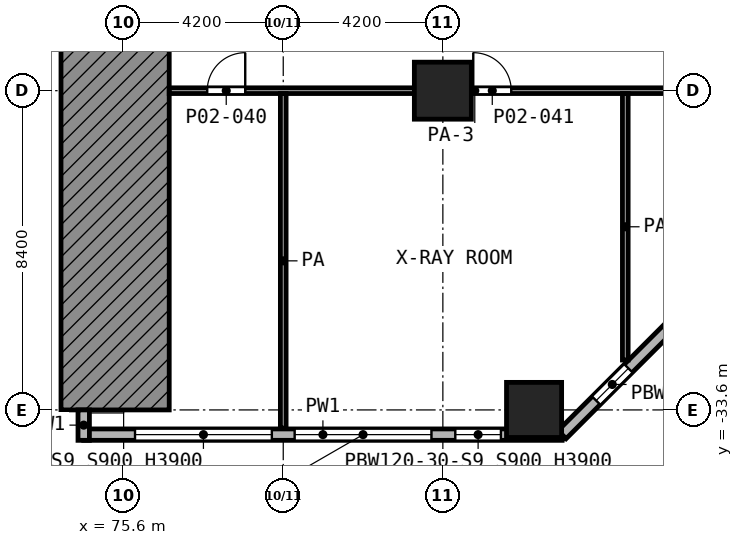
"""IFC4 building model, lengths in metres.
Left out: names, types, materials, properties, quantities, classifications, styles, units other than length and angle.
Written with IfcOpenShell. Run it as: python <this file> out.ifc"""

import sys

from ifc_helpers import new_model, si_unit, direction, frame, frame_2d, origin, origin_2d, place, context, subcontext, project, spatial, polyline, rectangle, outline, extrude, element, fill, save


model = new_model("IFC4")
c1 = context("Model", 3, precision=1e-05, world=origin(), true_north=direction((0.0, 1.0)))
c2 = subcontext(c1, "Body", "Model", "MODEL_VIEW")
j1 = project(units=[si_unit("LENGTHUNIT", "METRE"), si_unit("PLANEANGLEUNIT", "RADIAN")], contexts=[c1])
p1 = place(None, origin())
s1 = spatial("IfcSite", under=j1, at=p1, CompositionType="ELEMENT")
p2 = place(p1, origin())
s2 = spatial("IfcBuilding", under=s1, at=p2, CompositionType="ELEMENT")
p3 = place(p2, frame((0.0, 0.0, 7.0)))
s3 = spatial("IfcBuildingStorey", under=s2, at=p3, CompositionType="ELEMENT", Elevation=7.0)
p4 = place(p3, frame((84.0, -25.2, 0.0), z_axis=(0.0, 0.0, 1.0), x_axis=(1.0, 0.0, 0.0)))
e1 = element("IfcColumn", 1, at=p4, inside=s3, PredefinedType="COLUMN", context=c2, shape_type="SweptSolid", body=[
    extrude(rectangle(XDim=1.5, YDim=1.5, at=origin_2d()), origin(), (0.0, 0.0, 1.0), 5.6),
])
p5 = place(p3, frame((86.4, -33.6, 0.0), z_axis=(0.0, 0.0, 1.0), x_axis=(1.0, 0.0, 0.0)))
e2 = element("IfcColumn", 2, at=p5, inside=s3, PredefinedType="COLUMN", context=c2, shape_type="SweptSolid", body=[
    extrude(rectangle(XDim=1.45, YDim=1.45, at=origin_2d()), origin(), (0.0, 0.0, 1.0), 5.6),
])
p6 = place(p3, frame((0.0, 0.0, -7.0), z_axis=(0.0, -1.0, 0.0), x_axis=(1.0, 0.0, 0.0)))
e3 = element("IfcWall", 3, at=p6, inside=s3, PredefinedType="SHEAR", context=c2, shape_type="SweptSolid", body=[
    extrude(outline(polyline([(74.4, 7.0), (74.4, 9.0), (74.241, 11.256), (73.952, 12.6), (76.8, 12.6), (76.8, 7.0), (74.4, 7.0)])), origin(), (0.0, 0.0, 1.0), 33.6),
])
p7 = place(p3, frame((74.55, -33.6, 0.0), z_axis=(0.0, 0.0, 1.0), x_axis=(0.0, -1.0, 0.0)))
e4 = element("IfcWall", 4, at=p7, inside=s3, PredefinedType="SOLIDWALL", context=c2, shape_type="SweptSolid", body=[
    extrude(rectangle(XDim=0.8, YDim=0.3, at=frame_2d((0.4, 0.0))), origin(), (0.0, 0.0, 1.0), 5.25),
])
p8 = place(p3, frame((74.55, -34.25, 0.0), z_axis=(0.0, 0.0, 1.0), x_axis=(1.0, 0.0, 0.0)))
e5 = element("IfcWall", 5, at=p8, inside=s3, PredefinedType="SOLIDWALL", context=c2, shape_type="SweptSolid", body=[
    extrude(rectangle(XDim=12.588, YDim=0.3, at=frame_2d((6.294, 0.0))), origin(), (0.0, 0.0, 1.0), 5.25),
])
p9 = place(p8, frame((1.35, 0.0, 0.9)))
e6 = element("IfcOpeningElement", 6, at=p9, cuts=e5, PredefinedType="OPENING", context=c2, shape_type="SweptSolid", body=[
    extrude(rectangle(XDim=3.6, YDim=3.0, at=frame_2d((1.8, 1.5))), frame((0.0, 0.16, 0.0), z_axis=(0.0, -1.0, 0.0), x_axis=(1.0, 0.0, 0.0)), (0.0, 0.0, 1.0), 0.32),
])
p10 = place(p8, frame((5.55, 0.0, 0.9)))
e7 = element("IfcOpeningElement", 7, at=p10, cuts=e5, PredefinedType="OPENING", context=c2, shape_type="SweptSolid", body=[
    extrude(rectangle(XDim=3.6, YDim=3.0, at=frame_2d((1.8, 1.5))), frame((0.0, 0.16, 0.0), z_axis=(0.0, -1.0, 0.0), x_axis=(1.0, 0.0, 0.0)), (0.0, 0.0, 1.0), 0.32),
])
p11 = place(p8, frame((9.778, 0.0, 0.9)))
e8 = element("IfcOpeningElement", 8, at=p11, cuts=e5, PredefinedType="OPENING", context=c2, shape_type="SweptSolid", body=[
    extrude(rectangle(XDim=1.2, YDim=3.0, at=frame_2d((0.6, 1.5))), frame((0.0, 0.16, 0.0), z_axis=(0.0, -1.0, 0.0), x_axis=(1.0, 0.0, 0.0)), (0.0, 0.0, 1.0), 0.32),
])
p12 = place(p3, frame((87.138, -34.25, 0.0), z_axis=(0.0, 0.0, 1.0), x_axis=(0.707106781187, 0.707106781187, 0.0)))
e9 = element("IfcWall", 9, at=p12, inside=s3, PredefinedType="SOLIDWALL", context=c2, shape_type="SweptSolid", body=[
    extrude(rectangle(XDim=8.361, YDim=0.3, at=frame_2d((4.181, 0.0))), origin(), (0.0, 0.0, 1.0), 5.25),
])
p13 = place(p12, frame((1.267, 0.0, 0.9)))
e10 = element("IfcOpeningElement", 10, at=p13, cuts=e9, PredefinedType="OPENING", context=c2, shape_type="SweptSolid", body=[
    extrude(rectangle(XDim=1.2, YDim=3.0, at=frame_2d((0.6, 1.5))), frame((0.0, 0.16, 0.0), z_axis=(0.0, -1.0, 0.0), x_axis=(1.0, 0.0, 0.0)), (0.0, 0.0, 1.0), 0.32),
])
p14 = place(p12, frame((4.679, 0.0, 0.9)))
e11 = element("IfcOpeningElement", 11, at=p14, cuts=e9, PredefinedType="OPENING", context=c2, shape_type="SweptSolid", body=[
    extrude(rectangle(XDim=2.4, YDim=3.0, at=frame_2d((1.2, 1.5))), frame((0.0, 0.16, 0.0), z_axis=(0.0, -1.0, 0.0), x_axis=(1.0, 0.0, 0.0)), (0.0, 0.0, 1.0), 0.32),
])
p15 = place(p3, frame((76.8, -25.2, 0.0), z_axis=(0.0, 0.0, 1.0), x_axis=(1.0, 0.0, 0.0)))
e12 = element("IfcWall", 12, at=p15, inside=s3, PredefinedType="PARTITIONING", context=c2, shape_type="SweptSolid", body=[
    extrude(rectangle(XDim=16.08, YDim=0.15, at=frame_2d((8.04, 0.0))), origin(), (0.0, 0.0, 1.0), 3.85),
])
p16 = place(p15, frame((1.0, 0.0, 0.0)))
e13 = element("IfcOpeningElement", 13, at=p16, cuts=e12, PredefinedType="OPENING", context=c2, shape_type="SweptSolid", body=[
    extrude(rectangle(XDim=1.0, YDim=2.1, at=frame_2d((0.5, 1.05))), frame((0.0, 0.085, 0.0), z_axis=(0.0, -1.0, 0.0), x_axis=(1.0, 0.0, 0.0)), (0.0, 0.0, 1.0), 0.17),
])
p17 = place(p15, frame((8.0, 0.0, 0.0)))
e14 = element("IfcOpeningElement", 14, at=p17, cuts=e12, PredefinedType="OPENING", context=c2, shape_type="SweptSolid", body=[
    extrude(rectangle(XDim=1.0, YDim=2.1, at=frame_2d((0.5, 1.05))), frame((0.0, 0.085, 0.0), z_axis=(0.0, -1.0, 0.0), x_axis=(1.0, 0.0, 0.0)), (0.0, 0.0, 1.0), 0.17),
])
p18 = place(p15, frame((13.7, 0.0, 0.0)))
e15 = element("IfcOpeningElement", 15, at=p18, cuts=e12, PredefinedType="OPENING", context=c2, shape_type="SweptSolid", body=[
    extrude(rectangle(XDim=1.0, YDim=2.1, at=frame_2d((0.5, 1.05))), frame((0.0, 0.085, 0.0), z_axis=(0.0, -1.0, 0.0), x_axis=(1.0, 0.0, 0.0)), (0.0, 0.0, 1.0), 0.17),
])
p19 = place(p3, frame((79.8, -34.08, 0.0), z_axis=(0.0, 0.0, 1.0), x_axis=(0.0, 1.0, 0.0)))
e16 = element("IfcWall", 16, at=p19, inside=s3, PredefinedType="PARTITIONING", context=c2, shape_type="SweptSolid", body=[
    extrude(rectangle(XDim=8.805, YDim=0.15, at=frame_2d((4.403, 0.0))), origin(), (0.0, 0.0, 1.0), 5.25),
])
p20 = place(p3, frame((88.8, -32.287, 0.0), z_axis=(0.0, 0.0, 1.0), x_axis=(0.0, 1.0, 0.0)))
e17 = element("IfcWall", 17, at=p20, inside=s3, PredefinedType="PARTITIONING", context=c2, shape_type="SweptSolid", body=[
    extrude(rectangle(XDim=7.012, YDim=0.15, at=frame_2d((3.506, 0.0))), origin(), (0.0, 0.0, 1.0), 3.85),
])
p21 = place(p9, origin())
e18 = element("IfcWindow", 18, at=p21, inside=s3, PartitioningType="SINGLE_PANEL", PredefinedType="WINDOW", context=c2, shape_type="SweptSolid", body=[
    extrude(rectangle(XDim=3.6, YDim=3.0, at=frame_2d((1.8, 1.5))), frame((0.0, 0.03, 0.0), z_axis=(0.0, -1.0, 0.0), x_axis=(1.0, 0.0, 0.0)), (0.0, 0.0, 1.0), 0.06),
])
fill(e6, e18)
p22 = place(p10, origin())
e19 = element("IfcWindow", 19, at=p22, inside=s3, PartitioningType="SINGLE_PANEL", PredefinedType="WINDOW", context=c2, shape_type="SweptSolid", body=[
    extrude(rectangle(XDim=3.6, YDim=3.0, at=frame_2d((1.8, 1.5))), frame((0.0, 0.03, 0.0), z_axis=(0.0, -1.0, 0.0), x_axis=(1.0, 0.0, 0.0)), (0.0, 0.0, 1.0), 0.06),
])
fill(e7, e19)
p23 = place(p11, origin())
e20 = element("IfcWindow", 20, at=p23, inside=s3, PartitioningType="SINGLE_PANEL", PredefinedType="WINDOW", context=c2, shape_type="SweptSolid", body=[
    extrude(rectangle(XDim=1.2, YDim=3.0, at=frame_2d((0.6, 1.5))), frame((0.0, 0.03, 0.0), z_axis=(0.0, -1.0, 0.0), x_axis=(1.0, 0.0, 0.0)), (0.0, 0.0, 1.0), 0.06),
])
fill(e8, e20)
p24 = place(p13, origin())
e21 = element("IfcWindow", 21, at=p24, inside=s3, PartitioningType="SINGLE_PANEL", PredefinedType="WINDOW", context=c2, shape_type="SweptSolid", body=[
    extrude(rectangle(XDim=1.2, YDim=3.0, at=frame_2d((0.6, 1.5))), frame((0.0, 0.03, 0.0), z_axis=(0.0, -1.0, 0.0), x_axis=(1.0, 0.0, 0.0)), (0.0, 0.0, 1.0), 0.06),
])
fill(e10, e21)
p25 = place(p16, origin())
e22 = element("IfcDoor", 22, at=p25, inside=s3, OperationType="SINGLE_SWING_RIGHT", PredefinedType="DOOR", context=c2, shape_type="SweptSolid", body=[
    extrude(rectangle(XDim=1.0, YDim=2.1, at=frame_2d((0.5, 1.05))), frame((0.0, 0.025, 0.0), z_axis=(0.0, -1.0, 0.0), x_axis=(1.0, 0.0, 0.0)), (0.0, 0.0, 1.0), 0.05),
])
fill(e13, e22)
p26 = place(p17, origin())
e23 = element("IfcDoor", 23, at=p26, inside=s3, OperationType="SINGLE_SWING_LEFT", PredefinedType="DOOR", context=c2, shape_type="SweptSolid", body=[
    extrude(rectangle(XDim=1.0, YDim=2.1, at=frame_2d((0.5, 1.05))), frame((0.0, 0.025, 0.0), z_axis=(0.0, -1.0, 0.0), x_axis=(1.0, 0.0, 0.0)), (0.0, 0.0, 1.0), 0.05),
])
fill(e14, e23)
save(model, sys.argv[1])
